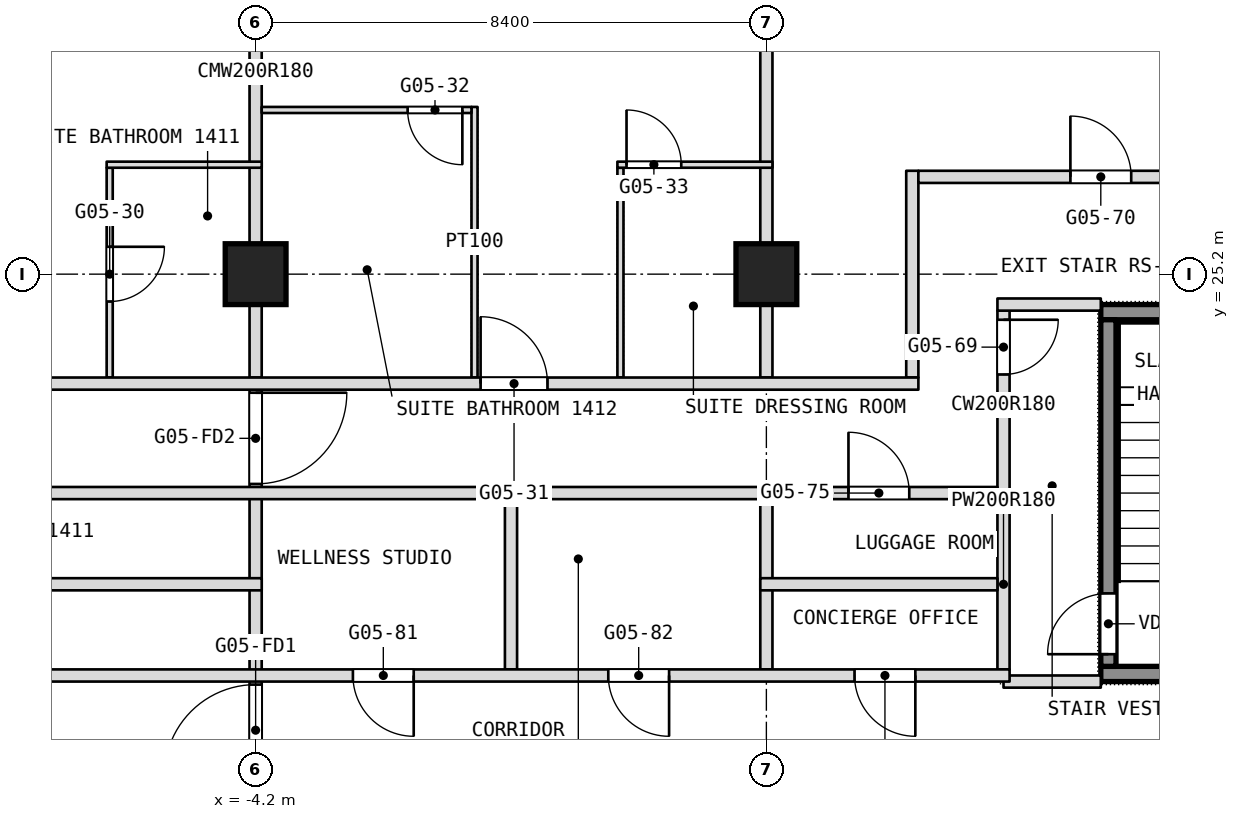
"""IFC4 building model, lengths in metres.
Left out: names, types, materials, properties, quantities, classifications, styles, units other than length and angle.
Written with IfcOpenShell. Run it as: python <this file> out.ifc"""

import sys

from ifc_helpers import new_model, si_unit, direction, frame, frame_2d, origin, origin_2d, place, context, subcontext, project, spatial, rectangle, extrude, element, fill, save


model = new_model("IFC4")
c1 = context("Model", 3, precision=1e-05, world=origin(), true_north=direction((0.0, 1.0)))
c2 = subcontext(c1, "Body", "Model", "MODEL_VIEW")
j1 = project(units=[si_unit("LENGTHUNIT", "METRE"), si_unit("PLANEANGLEUNIT", "RADIAN")], contexts=[c1])
p1 = place(None, origin())
s1 = spatial("IfcSite", under=j1, at=p1, CompositionType="ELEMENT")
p2 = place(p1, origin())
s2 = spatial("IfcBuilding", under=s1, at=p2, CompositionType="ELEMENT")
p3 = place(p2, frame((0.0, 0.0, 65.3)))
s3 = spatial("IfcBuildingStorey", under=s2, at=p3, CompositionType="ELEMENT", Elevation=65.3)
for number, where, z_axis, x_axis in (
    (1, (-4.2, 25.2, 0.0), (0.0, 0.0, 1.0), (1.0, 0.0, 0.0)),
    (2, (4.2, 25.2, 0.0), (0.0, 0.0, 1.0), (1.0, 0.0, 0.0)),
):
    element("IfcColumn", number, at=place(p3, frame(where, z_axis=z_axis, x_axis=x_axis)), inside=s3, PredefinedType="COLUMN", context=c2, shape_type="SweptSolid", body=[
        extrude(rectangle(XDim=1.0, YDim=1.0, at=origin_2d()), origin(), (0.0, 0.0, 1.0), 3.6),
    ])
p4 = place(p3, frame((8.1, 18.7, 0.0), z_axis=(0.0, 0.0, 1.0), x_axis=(0.0, 1.0, 0.0)))
e3 = element("IfcWall", 3, at=p4, inside=s3, PredefinedType="PARTITIONING", context=c2, shape_type="SweptSolid", body=[
    extrude(rectangle(XDim=2.8, YDim=0.2, at=frame_2d((1.4, 0.0))), origin(), (0.0, 0.0, 1.0), 3.34),
])
p5 = place(p3, frame((8.1, 21.5, 0.0), z_axis=(0.0, 0.0, 1.0), x_axis=(0.0, 1.0, 0.0)))
e4 = element("IfcWall", 4, at=p5, inside=s3, PredefinedType="PARTITIONING", context=c2, shape_type="SweptSolid", body=[
    extrude(rectangle(XDim=3.1, YDim=0.2, at=frame_2d((1.55, 0.0))), origin(), (0.0, 0.0, 1.0), 3.34),
])
p6 = place(p5, frame((2.05, 0.0, 0.0)))
e5 = element("IfcOpeningElement", 5, at=p6, cuts=e4, PredefinedType="OPENING", context=c2, shape_type="SweptSolid", body=[
    extrude(rectangle(XDim=0.9, YDim=2.1, at=frame_2d((0.45, 1.05))), frame((0.0, 0.1, 0.0), z_axis=(0.0, -1.0, 0.0), x_axis=(1.0, 0.0, 0.0)), (0.0, 0.0, 1.0), 0.2),
])
p7 = place(p3, frame((6.6, 23.5, 0.0), z_axis=(0.0, 0.0, 1.0), x_axis=(0.0, 1.0, 0.0)))
e6 = element("IfcWall", 6, at=p7, inside=s3, PredefinedType="PARTITIONING", context=c2, shape_type="SweptSolid", body=[
    extrude(rectangle(XDim=3.4, YDim=0.2, at=frame_2d((1.7, 0.0))), origin(), (0.0, 0.0, 1.0), 3.34),
])
p8 = place(p3, frame((4.2, 18.7, 0.0), z_axis=(0.0, 0.0, 1.0), x_axis=(0.0, 1.0, 0.0)))
e7 = element("IfcWall", 7, at=p8, inside=s3, PredefinedType="PARTITIONING", context=c2, shape_type="SweptSolid", body=[
    extrude(rectangle(XDim=2.8, YDim=0.2, at=frame_2d((1.4, 0.0))), origin(), (0.0, 0.0, 1.0), 3.34),
])
p9 = place(p3, frame((4.2, 23.5, 0.0), z_axis=(0.0, 0.0, 1.0), x_axis=(0.0, 1.0, 0.0)))
e8 = element("IfcWall", 8, at=p9, inside=s3, PredefinedType="PARTITIONING", context=c2, shape_type="SweptSolid", body=[
    extrude(rectangle(XDim=10.04, YDim=0.2, at=frame_2d((5.02, 0.0))), origin(), (0.0, 0.0, 1.0), 3.34),
])
p10 = place(p3, frame((1.8, 23.5, 0.0), z_axis=(0.0, 0.0, 1.0), x_axis=(0.0, 1.0, 0.0)))
e9 = element("IfcWall", 9, at=p10, inside=s3, PredefinedType="PARTITIONING", context=c2, shape_type="SweptSolid", body=[
    extrude(rectangle(XDim=3.45, YDim=0.1, at=frame_2d((1.725, 0.0))), origin(), (0.0, 0.0, 1.0), 3.34),
])
p11 = place(p3, frame((0.0, 18.7, 0.0), z_axis=(0.0, 0.0, 1.0), x_axis=(0.0, 1.0, 0.0)))
e10 = element("IfcWall", 10, at=p11, inside=s3, PredefinedType="PARTITIONING", context=c2, shape_type="SweptSolid", body=[
    extrude(rectangle(XDim=2.8, YDim=0.2, at=frame_2d((1.4, 0.0))), origin(), (0.0, 0.0, 1.0), 3.34),
])
p12 = place(p3, frame((-0.6, 23.5, 0.0), z_axis=(0.0, 0.0, 1.0), x_axis=(0.0, 1.0, 0.0)))
e11 = element("IfcWall", 11, at=p12, inside=s3, PredefinedType="PARTITIONING", context=c2, shape_type="SweptSolid", body=[
    extrude(rectangle(XDim=4.45, YDim=0.1, at=frame_2d((2.225, 0.0))), origin(), (0.0, 0.0, 1.0), 3.34),
])
p13 = place(p3, frame((-4.2, 16.8, 0.0), z_axis=(0.0, 0.0, 1.0), x_axis=(0.0, 1.0, 0.0)))
e12 = element("IfcWall", 12, at=p13, inside=s3, PredefinedType="PARTITIONING", context=c2, shape_type="SweptSolid", body=[
    extrude(rectangle(XDim=6.7, YDim=0.2, at=frame_2d((3.35, 0.0))), origin(), (0.0, 0.0, 1.0), 3.34),
])
p14 = place(p13, frame((0.15, 0.0, 0.0)))
e13 = element("IfcOpeningElement", 13, at=p14, cuts=e12, PredefinedType="OPENING", context=c2, shape_type="SweptSolid", body=[
    extrude(rectangle(XDim=1.5, YDim=2.1, at=frame_2d((0.75, 1.05))), frame((0.0, 0.1, 0.0), z_axis=(0.0, -1.0, 0.0), x_axis=(1.0, 0.0, 0.0)), (0.0, 0.0, 1.0), 0.2),
])
p15 = place(p13, frame((4.95, 0.0, 0.0)))
e14 = element("IfcOpeningElement", 14, at=p15, cuts=e12, PredefinedType="OPENING", context=c2, shape_type="SweptSolid", body=[
    extrude(rectangle(XDim=1.5, YDim=2.1, at=frame_2d((0.75, 1.05))), frame((0.0, 0.1, 0.0), z_axis=(0.0, -1.0, 0.0), x_axis=(1.0, 0.0, 0.0)), (0.0, 0.0, 1.0), 0.2),
])
p16 = place(p3, frame((-4.2, 23.5, 0.0), z_axis=(0.0, 0.0, 1.0), x_axis=(0.0, 1.0, 0.0)))
e15 = element("IfcWall", 15, at=p16, inside=s3, PredefinedType="PARTITIONING", context=c2, shape_type="SweptSolid", body=[
    extrude(rectangle(XDim=10.04, YDim=0.2, at=frame_2d((5.02, 0.0))), origin(), (0.0, 0.0, 1.0), 3.34),
])
p17 = place(p3, frame((-6.6, 23.5, 0.0), z_axis=(0.0, 0.0, 1.0), x_axis=(0.0, 1.0, 0.0)))
e16 = element("IfcWall", 16, at=p17, inside=s3, PredefinedType="PARTITIONING", context=c2, shape_type="SweptSolid", body=[
    extrude(rectangle(XDim=3.45, YDim=0.1, at=frame_2d((1.725, 0.0))), origin(), (0.0, 0.0, 1.0), 3.34),
])
p18 = place(p17, frame((1.25, 0.0, 0.0)))
e17 = element("IfcOpeningElement", 17, at=p18, cuts=e16, PredefinedType="OPENING", context=c2, shape_type="SweptSolid", body=[
    extrude(rectangle(XDim=0.9, YDim=2.1, at=frame_2d((0.45, 1.05))), frame((0.0, 0.05, 0.0), z_axis=(0.0, -1.0, 0.0), x_axis=(1.0, 0.0, 0.0)), (0.0, 0.0, 1.0), 0.1),
])
p19 = place(p3, frame((8.1, 18.5, 0.0), z_axis=(0.0, 0.0, 1.0), x_axis=(1.0, 0.0, 0.0)))
e18 = element("IfcWall", 18, at=p19, inside=s3, PredefinedType="PARTITIONING", context=c2, shape_type="SweptSolid", body=[
    extrude(rectangle(XDim=1.6, YDim=0.2, at=frame_2d((0.8, 0.0))), origin(), (0.0, 0.0, 1.0), 3.34),
])
p20 = place(p3, frame((-16.9, 18.6, 0.0), z_axis=(0.0, 0.0, 1.0), x_axis=(1.0, 0.0, 0.0)))
e19 = element("IfcWall", 19, at=p20, inside=s3, PredefinedType="PARTITIONING", context=c2, shape_type="SweptSolid", body=[
    extrude(rectangle(XDim=25.1, YDim=0.2, at=frame_2d((12.55, 0.0))), origin(), (0.0, 0.0, 1.0), 3.34),
])
p21 = place(p20, frame((1.7, 0.0, 0.0)))
e20 = element("IfcOpeningElement", 20, at=p21, cuts=e19, PredefinedType="OPENING", context=c2, shape_type="SweptSolid", body=[
    extrude(rectangle(XDim=1.0, YDim=2.1, at=frame_2d((0.5, 1.05))), frame((0.0, 0.1, 0.0), z_axis=(0.0, -1.0, 0.0), x_axis=(1.0, 0.0, 0.0)), (0.0, 0.0, 1.0), 0.2),
])
p22 = place(p20, frame((8.0, 0.0, 0.0)))
e21 = element("IfcOpeningElement", 21, at=p22, cuts=e19, PredefinedType="OPENING", context=c2, shape_type="SweptSolid", body=[
    extrude(rectangle(XDim=1.0, YDim=2.1, at=frame_2d((0.5, 1.05))), frame((0.0, 0.1, 0.0), z_axis=(0.0, -1.0, 0.0), x_axis=(1.0, 0.0, 0.0)), (0.0, 0.0, 1.0), 0.2),
])
p23 = place(p20, frame((22.55, 0.0, 0.0)))
e22 = element("IfcOpeningElement", 22, at=p23, cuts=e19, PredefinedType="OPENING", context=c2, shape_type="SweptSolid", body=[
    extrude(rectangle(XDim=1.0, YDim=2.1, at=frame_2d((0.5, 1.05))), frame((0.0, 0.1, 0.0), z_axis=(0.0, -1.0, 0.0), x_axis=(1.0, 0.0, 0.0)), (0.0, 0.0, 1.0), 0.2),
])
p24 = place(p20, frame((14.3, 0.0, 0.0)))
e23 = element("IfcOpeningElement", 23, at=p24, cuts=e19, PredefinedType="OPENING", context=c2, shape_type="SweptSolid", body=[
    extrude(rectangle(XDim=1.0, YDim=2.1, at=frame_2d((0.5, 1.05))), frame((0.0, 0.1, 0.0), z_axis=(0.0, -1.0, 0.0), x_axis=(1.0, 0.0, 0.0)), (0.0, 0.0, 1.0), 0.2),
])
p25 = place(p20, frame((18.5, 0.0, 0.0)))
e24 = element("IfcOpeningElement", 24, at=p25, cuts=e19, PredefinedType="OPENING", context=c2, shape_type="SweptSolid", body=[
    extrude(rectangle(XDim=1.0, YDim=2.1, at=frame_2d((0.5, 1.05))), frame((0.0, 0.1, 0.0), z_axis=(0.0, -1.0, 0.0), x_axis=(1.0, 0.0, 0.0)), (0.0, 0.0, 1.0), 0.2),
])
p26 = place(p3, frame((-12.5, 20.1, 0.0), z_axis=(0.0, 0.0, 1.0), x_axis=(1.0, 0.0, 0.0)))
e25 = element("IfcWall", 25, at=p26, inside=s3, PredefinedType="PARTITIONING", context=c2, shape_type="SweptSolid", body=[
    extrude(rectangle(XDim=8.4, YDim=0.2, at=frame_2d((4.2, 0.0))), origin(), (0.0, 0.0, 1.0), 3.34),
])
p27 = place(p3, frame((4.1, 20.1, 0.0), z_axis=(0.0, 0.0, 1.0), x_axis=(1.0, 0.0, 0.0)))
e26 = element("IfcWall", 26, at=p27, inside=s3, PredefinedType="PARTITIONING", context=c2, shape_type="SweptSolid", body=[
    extrude(rectangle(XDim=3.9, YDim=0.2, at=frame_2d((1.95, 0.0))), origin(), (0.0, 0.0, 1.0), 3.34),
])
p28 = place(p3, frame((-16.7, 21.6, 0.0), z_axis=(0.0, 0.0, 1.0), x_axis=(1.0, 0.0, 0.0)))
e27 = element("IfcWall", 27, at=p28, inside=s3, PredefinedType="PARTITIONING", context=c2, shape_type="SweptSolid", body=[
    extrude(rectangle(XDim=24.7, YDim=0.2, at=frame_2d((12.35, 0.0))), origin(), (0.0, 0.0, 1.0), 3.34),
])
p29 = place(p28, frame((7.8, 0.0, 0.0)))
e28 = element("IfcOpeningElement", 28, at=p29, cuts=e27, PredefinedType="OPENING", context=c2, shape_type="SweptSolid", body=[
    extrude(rectangle(XDim=1.0, YDim=2.1, at=frame_2d((0.5, 1.05))), frame((0.0, 0.1, 0.0), z_axis=(0.0, -1.0, 0.0), x_axis=(1.0, 0.0, 0.0)), (0.0, 0.0, 1.0), 0.2),
])
p30 = place(p28, frame((22.25, 0.0, 0.0)))
e29 = element("IfcOpeningElement", 29, at=p30, cuts=e27, PredefinedType="OPENING", context=c2, shape_type="SweptSolid", body=[
    extrude(rectangle(XDim=1.0, YDim=2.1, at=frame_2d((0.5, 1.05))), frame((0.0, 0.1, 0.0), z_axis=(0.0, -1.0, 0.0), x_axis=(1.0, 0.0, 0.0)), (0.0, 0.0, 1.0), 0.2),
])
p31 = place(p3, frame((-16.7, 23.4, 0.0), z_axis=(0.0, 0.0, 1.0), x_axis=(1.0, 0.0, 0.0)))
e30 = element("IfcWall", 30, at=p31, inside=s3, PredefinedType="PARTITIONING", context=c2, shape_type="SweptSolid", body=[
    extrude(rectangle(XDim=23.4, YDim=0.2, at=frame_2d((11.7, 0.0))), origin(), (0.0, 0.0, 1.0), 3.34),
])
p32 = place(p31, frame((2.4, 0.0, 0.0)))
e31 = element("IfcOpeningElement", 31, at=p32, cuts=e30, PredefinedType="OPENING", context=c2, shape_type="SweptSolid", body=[
    extrude(rectangle(XDim=0.9, YDim=2.1, at=frame_2d((0.45, 1.05))), frame((0.0, 0.1, 0.0), z_axis=(0.0, -1.0, 0.0), x_axis=(1.0, 0.0, 0.0)), (0.0, 0.0, 1.0), 0.2),
])
p33 = place(p31, frame((5.65, 0.0, 0.0)))
e32 = element("IfcOpeningElement", 32, at=p33, cuts=e30, PredefinedType="OPENING", context=c2, shape_type="SweptSolid", body=[
    extrude(rectangle(XDim=1.1, YDim=2.1, at=frame_2d((0.55, 1.05))), frame((0.0, 0.1, 0.0), z_axis=(0.0, -1.0, 0.0), x_axis=(1.0, 0.0, 0.0)), (0.0, 0.0, 1.0), 0.2),
])
p34 = place(p31, frame((16.2, 0.0, 0.0)))
e33 = element("IfcOpeningElement", 33, at=p34, cuts=e30, PredefinedType="OPENING", context=c2, shape_type="SweptSolid", body=[
    extrude(rectangle(XDim=1.1, YDim=2.1, at=frame_2d((0.55, 1.05))), frame((0.0, 0.1, 0.0), z_axis=(0.0, -1.0, 0.0), x_axis=(1.0, 0.0, 0.0)), (0.0, 0.0, 1.0), 0.2),
])
p35 = place(p3, frame((8.0, 24.7, 0.0), z_axis=(0.0, 0.0, 1.0), x_axis=(1.0, 0.0, 0.0)))
e34 = element("IfcWall", 34, at=p35, inside=s3, PredefinedType="PARTITIONING", context=c2, shape_type="SweptSolid", body=[
    extrude(rectangle(XDim=1.7, YDim=0.2, at=frame_2d((0.85, 0.0))), origin(), (0.0, 0.0, 1.0), 3.34),
])
p36 = place(p3, frame((6.7, 26.8, 0.0), z_axis=(0.0, 0.0, 1.0), x_axis=(1.0, 0.0, 0.0)))
e35 = element("IfcWall", 35, at=p36, inside=s3, PredefinedType="PARTITIONING", context=c2, shape_type="SweptSolid", body=[
    extrude(rectangle(XDim=8.0, YDim=0.2, at=frame_2d((4.0, 0.0))), origin(), (0.0, 0.0, 1.0), 3.34),
])
p37 = place(p36, frame((2.5, 0.0, 0.0)))
e36 = element("IfcOpeningElement", 36, at=p37, cuts=e35, PredefinedType="OPENING", context=c2, shape_type="SweptSolid", body=[
    extrude(rectangle(XDim=1.0, YDim=2.1, at=frame_2d((0.5, 1.05))), frame((0.0, 0.1, 0.0), z_axis=(0.0, -1.0, 0.0), x_axis=(1.0, 0.0, 0.0)), (0.0, 0.0, 1.0), 0.2),
])
p38 = place(p3, frame((-6.65, 27.0, 0.0), z_axis=(0.0, 0.0, 1.0), x_axis=(1.0, 0.0, 0.0)))
e37 = element("IfcWall", 37, at=p38, inside=s3, PredefinedType="PARTITIONING", context=c2, shape_type="SweptSolid", body=[
    extrude(rectangle(XDim=2.55, YDim=0.1, at=frame_2d((1.275, 0.0))), origin(), (0.0, 0.0, 1.0), 3.34),
])
p39 = place(p3, frame((1.75, 27.0, 0.0), z_axis=(0.0, 0.0, 1.0), x_axis=(1.0, 0.0, 0.0)))
e38 = element("IfcWall", 38, at=p39, inside=s3, PredefinedType="PARTITIONING", context=c2, shape_type="SweptSolid", body=[
    extrude(rectangle(XDim=2.55, YDim=0.1, at=frame_2d((1.275, 0.0))), origin(), (0.0, 0.0, 1.0), 3.34),
])
p40 = place(p39, frame((0.15, 0.0, 0.0)))
e39 = element("IfcOpeningElement", 39, at=p40, cuts=e38, PredefinedType="OPENING", context=c2, shape_type="SweptSolid", body=[
    extrude(rectangle(XDim=0.9, YDim=2.1, at=frame_2d((0.45, 1.05))), frame((0.0, 0.05, 0.0), z_axis=(0.0, -1.0, 0.0), x_axis=(1.0, 0.0, 0.0)), (0.0, 0.0, 1.0), 0.1),
])
p41 = place(p3, frame((-4.1, 27.9, 0.0), z_axis=(0.0, 0.0, 1.0), x_axis=(1.0, 0.0, 0.0)))
e40 = element("IfcWall", 40, at=p41, inside=s3, PredefinedType="PARTITIONING", context=c2, shape_type="SweptSolid", body=[
    extrude(rectangle(XDim=3.45, YDim=0.1, at=frame_2d((1.725, 0.0))), origin(), (0.0, 0.0, 1.0), 3.34),
])
p42 = place(p41, frame((2.4, 0.0, 0.0)))
e41 = element("IfcOpeningElement", 41, at=p42, cuts=e40, PredefinedType="OPENING", context=c2, shape_type="SweptSolid", body=[
    extrude(rectangle(XDim=0.9, YDim=2.1, at=frame_2d((0.45, 1.05))), frame((0.0, 0.05, 0.0), z_axis=(0.0, -1.0, 0.0), x_axis=(1.0, 0.0, 0.0)), (0.0, 0.0, 1.0), 0.1),
])
for number, where, z_axis, x_axis in (
    (42, (9.7, 18.625, 0.1), (0.0, 0.0, 1.0), (1.0, 0.0, 0.0)),
    (43, (9.7, 24.575, 0.1), (0.0, 0.0, 1.0), (1.0, 0.0, 0.0)),
):
    element("IfcWall", number, at=place(p3, frame(where, z_axis=z_axis, x_axis=x_axis)), inside=s3, PredefinedType="SHEAR", context=c2, shape_type="SweptSolid", body=[
        extrude(rectangle(XDim=3.4, YDim=0.25, at=frame_2d((1.7, 0.0))), origin(), (0.0, 0.0, 1.0), 3.6),
    ])
p43 = place(p3, frame((9.825, 18.75, 0.1), z_axis=(0.0, 0.0, 1.0), x_axis=(0.0, 1.0, 0.0)))
e44 = element("IfcWall", 44, at=p43, inside=s3, PredefinedType="SHEAR", context=c2, shape_type="SweptSolid", body=[
    extrude(rectangle(XDim=5.7, YDim=0.25, at=frame_2d((2.85, 0.0))), origin(), (0.0, 0.0, 1.0), 3.6),
])
p44 = place(p43, frame((0.2, 0.0, 0.0)))
e45 = element("IfcOpeningElement", 45, at=p44, cuts=e44, PredefinedType="OPENING", context=c2, shape_type="SweptSolid", body=[
    extrude(rectangle(XDim=1.0, YDim=2.1, at=frame_2d((0.5, 1.05))), frame((0.0, 0.125, 0.0), z_axis=(0.0, -1.0, 0.0), x_axis=(1.0, 0.0, 0.0)), (0.0, 0.0, 1.0), 0.25),
])
p45 = place(p6, origin())
e46 = element("IfcDoor", 46, at=p45, inside=s3, OperationType="SINGLE_SWING_LEFT", PredefinedType="DOOR", context=c2, shape_type="SweptSolid", body=[
    extrude(rectangle(XDim=0.9, YDim=2.1, at=frame_2d((0.45, 1.05))), frame((0.0, 0.025, 0.0), z_axis=(0.0, -1.0, 0.0), x_axis=(1.0, 0.0, 0.0)), (0.0, 0.0, 1.0), 0.05),
])
fill(e5, e46)
p46 = place(p18, origin())
e47 = element("IfcDoor", 47, at=p46, inside=s3, OperationType="SINGLE_SWING_RIGHT", PredefinedType="DOOR", context=c2, shape_type="SweptSolid", body=[
    extrude(rectangle(XDim=0.9, YDim=2.1, at=frame_2d((0.45, 1.05))), frame((0.0, 0.025, 0.0), z_axis=(0.0, -1.0, 0.0), x_axis=(1.0, 0.0, 0.0)), (0.0, 0.0, 1.0), 0.05),
])
fill(e17, e47)
p47 = place(p23, origin())
e48 = element("IfcDoor", 48, at=p47, inside=s3, OperationType="SINGLE_SWING_RIGHT", PredefinedType="DOOR", context=c2, shape_type="SweptSolid", body=[
    extrude(rectangle(XDim=1.0, YDim=2.1, at=frame_2d((0.5, 1.05))), frame((0.0, 0.025, 0.0), z_axis=(0.0, -1.0, 0.0), x_axis=(1.0, 0.0, 0.0)), (0.0, 0.0, 1.0), 0.05),
])
fill(e22, e48)
p48 = place(p24, origin())
e49 = element("IfcDoor", 49, at=p48, inside=s3, OperationType="SINGLE_SWING_LEFT", PredefinedType="DOOR", context=c2, shape_type="SweptSolid", body=[
    extrude(rectangle(XDim=1.0, YDim=2.1, at=frame_2d((0.5, 1.05))), frame((0.0, 0.025, 0.0), z_axis=(0.0, -1.0, 0.0), x_axis=(1.0, 0.0, 0.0)), (0.0, 0.0, 1.0), 0.05),
])
fill(e23, e49)
p49 = place(p25, origin())
e50 = element("IfcDoor", 50, at=p49, inside=s3, OperationType="SINGLE_SWING_RIGHT", PredefinedType="DOOR", context=c2, shape_type="SweptSolid", body=[
    extrude(rectangle(XDim=1.0, YDim=2.1, at=frame_2d((0.5, 1.05))), frame((0.0, 0.025, 0.0), z_axis=(0.0, -1.0, 0.0), x_axis=(1.0, 0.0, 0.0)), (0.0, 0.0, 1.0), 0.05),
])
fill(e24, e50)
p50 = place(p30, origin())
e51 = element("IfcDoor", 51, at=p50, inside=s3, OperationType="SINGLE_SWING_LEFT", PredefinedType="DOOR", context=c2, shape_type="SweptSolid", body=[
    extrude(rectangle(XDim=1.0, YDim=2.1, at=frame_2d((0.5, 1.05))), frame((0.0, 0.025, 0.0), z_axis=(0.0, -1.0, 0.0), x_axis=(1.0, 0.0, 0.0)), (0.0, 0.0, 1.0), 0.05),
])
fill(e29, e51)
p51 = place(p34, origin())
e52 = element("IfcDoor", 52, at=p51, inside=s3, OperationType="SINGLE_SWING_LEFT", PredefinedType="DOOR", context=c2, shape_type="SweptSolid", body=[
    extrude(rectangle(XDim=1.1, YDim=2.1, at=frame_2d((0.55, 1.05))), frame((0.0, 0.025, 0.0), z_axis=(0.0, -1.0, 0.0), x_axis=(1.0, 0.0, 0.0)), (0.0, 0.0, 1.0), 0.05),
])
fill(e33, e52)
p52 = place(p37, origin())
e53 = element("IfcDoor", 53, at=p52, inside=s3, OperationType="SINGLE_SWING_RIGHT", PredefinedType="DOOR", context=c2, shape_type="SweptSolid", body=[
    extrude(rectangle(XDim=1.0, YDim=2.1, at=frame_2d((0.5, 1.05))), frame((0.0, 0.025, 0.0), z_axis=(0.0, -1.0, 0.0), x_axis=(1.0, 0.0, 0.0)), (0.0, 0.0, 1.0), 0.05),
])
fill(e36, e53)
p53 = place(p40, origin())
e54 = element("IfcDoor", 54, at=p53, inside=s3, OperationType="SINGLE_SWING_RIGHT", PredefinedType="DOOR", context=c2, shape_type="SweptSolid", body=[
    extrude(rectangle(XDim=0.9, YDim=2.1, at=frame_2d((0.45, 1.05))), frame((0.0, 0.025, 0.0), z_axis=(0.0, -1.0, 0.0), x_axis=(1.0, 0.0, 0.0)), (0.0, 0.0, 1.0), 0.05),
])
fill(e39, e54)
p54 = place(p42, origin())
e55 = element("IfcDoor", 55, at=p54, inside=s3, OperationType="SINGLE_SWING_LEFT", PredefinedType="DOOR", context=c2, shape_type="SweptSolid", body=[
    extrude(rectangle(XDim=0.9, YDim=2.1, at=frame_2d((0.45, 1.05))), frame((0.0, 0.025, 0.0), z_axis=(0.0, -1.0, 0.0), x_axis=(1.0, 0.0, 0.0)), (0.0, 0.0, 1.0), 0.05),
])
fill(e41, e55)
p55 = place(p44, origin())
e56 = element("IfcDoor", 56, at=p55, inside=s3, OperationType="SINGLE_SWING_LEFT", PredefinedType="DOOR", context=c2, shape_type="SweptSolid", body=[
    extrude(rectangle(XDim=1.0, YDim=2.1, at=frame_2d((0.5, 1.05))), frame((0.0, 0.025, 0.0), z_axis=(0.0, -1.0, 0.0), x_axis=(1.0, 0.0, 0.0)), (0.0, 0.0, 1.0), 0.05),
])
fill(e45, e56)
p56 = place(p14, origin())
e57 = element("IfcDoor", 57, at=p56, inside=s3, OperationType="DOUBLE_DOOR_DOUBLE_SWING", PredefinedType="DOOR", context=c2, shape_type="SweptSolid", body=[
    extrude(rectangle(XDim=1.5, YDim=2.1, at=frame_2d((0.75, 1.05))), frame((0.0, 0.025, 0.0), z_axis=(0.0, -1.0, 0.0), x_axis=(1.0, 0.0, 0.0)), (0.0, 0.0, 1.0), 0.05),
])
fill(e13, e57)
p57 = place(p15, origin())
e58 = element("IfcDoor", 58, at=p57, inside=s3, OperationType="DOUBLE_DOOR_DOUBLE_SWING", PredefinedType="DOOR", context=c2, shape_type="SweptSolid", body=[
    extrude(rectangle(XDim=1.5, YDim=2.1, at=frame_2d((0.75, 1.05))), frame((0.0, 0.025, 0.0), z_axis=(0.0, -1.0, 0.0), x_axis=(1.0, 0.0, 0.0)), (0.0, 0.0, 1.0), 0.05),
])
fill(e14, e58)
save(model, sys.argv[1])
